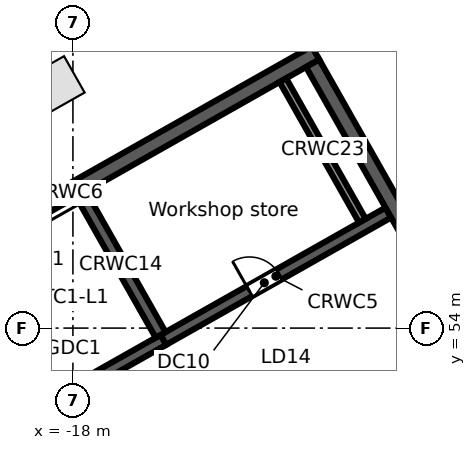
"""IFC4 building model, lengths in metres.
Left out: names, types, materials, properties, quantities, classifications, styles, units other than length and angle.
Written with IfcOpenShell. Run it as: python <this file> out.ifc"""

import sys

from ifc_helpers import new_model, si_unit, direction, frame, frame_2d, origin, origin_2d, place, context, subcontext, project, spatial, rectangle, extrude, element, fill, save


model = new_model("IFC4")
c1 = context("Model", 3, precision=1e-05, world=origin(), true_north=direction((0.0, 1.0)))
c2 = subcontext(c1, "Body", "Model", "MODEL_VIEW")
j1 = project(units=[si_unit("LENGTHUNIT", "METRE"), si_unit("PLANEANGLEUNIT", "RADIAN")], contexts=[c1])
p1 = place(None, origin())
s1 = spatial("IfcSite", under=j1, at=p1, CompositionType="ELEMENT")
p2 = place(p1, origin())
s2 = spatial("IfcBuilding", under=s1, at=p2, CompositionType="ELEMENT")
p3 = place(p2, frame((0.0, 0.0, 266.5)))
s3 = spatial("IfcBuildingStorey", under=s2, at=p3, CompositionType="ELEMENT", Elevation=266.5)
p4 = place(p3, frame((-18.441, 60.406, 0.0), z_axis=(0.0, 0.0, 1.0), x_axis=(-0.87035569594, -0.492423560103, 0.0)))
e1 = element("IfcColumn", 1, at=p4, inside=s3, PredefinedType="COLUMN", context=c2, shape_type="SweptSolid", body=[
    extrude(rectangle(XDim=1.1, YDim=1.1, at=origin_2d()), origin(), (0.0, 0.0, 1.0), 3.8),
])
p5 = place(p3, frame((-58.732, 38.771, 0.0), z_axis=(0.0, 0.0, 1.0), x_axis=(0.870355615581, 0.492423702137, 0.0)))
e2 = element("IfcWall", 2, at=p5, inside=s3, PredefinedType="STANDARD", context=c2, shape_type="SweptSolid", body=[
    extrude(rectangle(XDim=64.052, YDim=0.25, at=frame_2d((32.026, 0.0))), origin(), (0.0, 0.0, 1.0), 3.52),
])
p6 = place(p5, frame((61.259, 0.0, 0.8)))
e3 = element("IfcOpeningElement", 3, at=p6, cuts=e2, PredefinedType="OPENING", context=c2, shape_type="SweptSolid", body=[
    extrude(rectangle(XDim=2.4, YDim=2.2, at=frame_2d((1.2, 1.1))), frame((0.0, 0.135, 0.0), z_axis=(0.0, -1.0, 0.0), x_axis=(1.0, 0.0, 0.0)), (0.0, 0.0, 1.0), 0.27),
])
p7 = place(p5, frame((58.216, 0.0, 0.8)))
e4 = element("IfcOpeningElement", 4, at=p7, cuts=e2, PredefinedType="OPENING", context=c2, shape_type="SweptSolid", body=[
    extrude(rectangle(XDim=2.4, YDim=2.2, at=frame_2d((1.2, 1.1))), frame((0.0, 0.135, 0.0), z_axis=(0.0, -1.0, 0.0), x_axis=(1.0, 0.0, 0.0)), (0.0, 0.0, 1.0), 0.27),
])
p8 = place(p5, frame((55.173, 0.0, 0.8)))
e5 = element("IfcOpeningElement", 5, at=p8, cuts=e2, PredefinedType="OPENING", context=c2, shape_type="SweptSolid", body=[
    extrude(rectangle(XDim=2.4, YDim=2.2, at=frame_2d((1.2, 1.1))), frame((0.0, 0.135, 0.0), z_axis=(0.0, -1.0, 0.0), x_axis=(1.0, 0.0, 0.0)), (0.0, 0.0, 1.0), 0.27),
])
p9 = place(p5, frame((52.129, 0.0, 0.8)))
e6 = element("IfcOpeningElement", 6, at=p9, cuts=e2, PredefinedType="OPENING", context=c2, shape_type="SweptSolid", body=[
    extrude(rectangle(XDim=2.4, YDim=2.2, at=frame_2d((1.2, 1.1))), frame((0.0, 0.135, 0.0), z_axis=(0.0, -1.0, 0.0), x_axis=(1.0, 0.0, 0.0)), (0.0, 0.0, 1.0), 0.27),
])
p10 = place(p5, frame((49.086, 0.0, 0.8)))
e7 = element("IfcOpeningElement", 7, at=p10, cuts=e2, PredefinedType="OPENING", context=c2, shape_type="SweptSolid", body=[
    extrude(rectangle(XDim=2.4, YDim=2.2, at=frame_2d((1.2, 1.1))), frame((0.0, 0.135, 0.0), z_axis=(0.0, -1.0, 0.0), x_axis=(1.0, 0.0, 0.0)), (0.0, 0.0, 1.0), 0.27),
])
p11 = place(p5, frame((46.043, 0.0, 0.8)))
e8 = element("IfcOpeningElement", 8, at=p11, cuts=e2, PredefinedType="OPENING", context=c2, shape_type="SweptSolid", body=[
    extrude(rectangle(XDim=2.4, YDim=2.2, at=frame_2d((1.2, 1.1))), frame((0.0, 0.135, 0.0), z_axis=(0.0, -1.0, 0.0), x_axis=(1.0, 0.0, 0.0)), (0.0, 0.0, 1.0), 0.27),
])
p12 = place(p5, frame((43.0, 0.0, 0.8)))
e9 = element("IfcOpeningElement", 9, at=p12, cuts=e2, PredefinedType="OPENING", context=c2, shape_type="SweptSolid", body=[
    extrude(rectangle(XDim=2.4, YDim=2.2, at=frame_2d((1.2, 1.1))), frame((0.0, 0.135, 0.0), z_axis=(0.0, -1.0, 0.0), x_axis=(1.0, 0.0, 0.0)), (0.0, 0.0, 1.0), 0.27),
])
p13 = place(p5, frame((39.956, 0.0, 0.8)))
e10 = element("IfcOpeningElement", 10, at=p13, cuts=e2, PredefinedType="OPENING", context=c2, shape_type="SweptSolid", body=[
    extrude(rectangle(XDim=2.4, YDim=2.2, at=frame_2d((1.2, 1.1))), frame((0.0, 0.135, 0.0), z_axis=(0.0, -1.0, 0.0), x_axis=(1.0, 0.0, 0.0)), (0.0, 0.0, 1.0), 0.27),
])
p14 = place(p5, frame((36.913, 0.0, 0.8)))
e11 = element("IfcOpeningElement", 11, at=p14, cuts=e2, PredefinedType="OPENING", context=c2, shape_type="SweptSolid", body=[
    extrude(rectangle(XDim=2.4, YDim=2.2, at=frame_2d((1.2, 1.1))), frame((0.0, 0.135, 0.0), z_axis=(0.0, -1.0, 0.0), x_axis=(1.0, 0.0, 0.0)), (0.0, 0.0, 1.0), 0.27),
])
p15 = place(p5, frame((33.87, 0.0, 0.8)))
e12 = element("IfcOpeningElement", 12, at=p15, cuts=e2, PredefinedType="OPENING", context=c2, shape_type="SweptSolid", body=[
    extrude(rectangle(XDim=2.4, YDim=2.2, at=frame_2d((1.2, 1.1))), frame((0.0, 0.135, 0.0), z_axis=(0.0, -1.0, 0.0), x_axis=(1.0, 0.0, 0.0)), (0.0, 0.0, 1.0), 0.27),
])
p16 = place(p5, frame((30.826, 0.0, 0.8)))
e13 = element("IfcOpeningElement", 13, at=p16, cuts=e2, PredefinedType="OPENING", context=c2, shape_type="SweptSolid", body=[
    extrude(rectangle(XDim=2.4, YDim=2.2, at=frame_2d((1.2, 1.1))), frame((0.0, 0.135, 0.0), z_axis=(0.0, -1.0, 0.0), x_axis=(1.0, 0.0, 0.0)), (0.0, 0.0, 1.0), 0.27),
])
p17 = place(p5, frame((27.783, 0.0, 0.8)))
e14 = element("IfcOpeningElement", 14, at=p17, cuts=e2, PredefinedType="OPENING", context=c2, shape_type="SweptSolid", body=[
    extrude(rectangle(XDim=2.4, YDim=2.2, at=frame_2d((1.2, 1.1))), frame((0.0, 0.135, 0.0), z_axis=(0.0, -1.0, 0.0), x_axis=(1.0, 0.0, 0.0)), (0.0, 0.0, 1.0), 0.27),
])
p18 = place(p5, frame((24.74, 0.0, 0.8)))
e15 = element("IfcOpeningElement", 15, at=p18, cuts=e2, PredefinedType="OPENING", context=c2, shape_type="SweptSolid", body=[
    extrude(rectangle(XDim=2.4, YDim=2.2, at=frame_2d((1.2, 1.1))), frame((0.0, 0.135, 0.0), z_axis=(0.0, -1.0, 0.0), x_axis=(1.0, 0.0, 0.0)), (0.0, 0.0, 1.0), 0.27),
])
p19 = place(p5, frame((21.696, 0.0, 0.8)))
e16 = element("IfcOpeningElement", 16, at=p19, cuts=e2, PredefinedType="OPENING", context=c2, shape_type="SweptSolid", body=[
    extrude(rectangle(XDim=2.4, YDim=2.2, at=frame_2d((1.2, 1.1))), frame((0.0, 0.135, 0.0), z_axis=(0.0, -1.0, 0.0), x_axis=(1.0, 0.0, 0.0)), (0.0, 0.0, 1.0), 0.27),
])
p20 = place(p5, frame((18.653, 0.0, 0.8)))
e17 = element("IfcOpeningElement", 17, at=p20, cuts=e2, PredefinedType="OPENING", context=c2, shape_type="SweptSolid", body=[
    extrude(rectangle(XDim=2.4, YDim=2.2, at=frame_2d((1.2, 1.1))), frame((0.0, 0.135, 0.0), z_axis=(0.0, -1.0, 0.0), x_axis=(1.0, 0.0, 0.0)), (0.0, 0.0, 1.0), 0.27),
])
p21 = place(p5, frame((15.61, 0.0, 0.8)))
e18 = element("IfcOpeningElement", 18, at=p21, cuts=e2, PredefinedType="OPENING", context=c2, shape_type="SweptSolid", body=[
    extrude(rectangle(XDim=2.4, YDim=2.2, at=frame_2d((1.2, 1.1))), frame((0.0, 0.135, 0.0), z_axis=(0.0, -1.0, 0.0), x_axis=(1.0, 0.0, 0.0)), (0.0, 0.0, 1.0), 0.27),
])
p22 = place(p5, frame((12.567, 0.0, 0.8)))
e19 = element("IfcOpeningElement", 19, at=p22, cuts=e2, PredefinedType="OPENING", context=c2, shape_type="SweptSolid", body=[
    extrude(rectangle(XDim=2.4, YDim=2.2, at=frame_2d((1.2, 1.1))), frame((0.0, 0.135, 0.0), z_axis=(0.0, -1.0, 0.0), x_axis=(1.0, 0.0, 0.0)), (0.0, 0.0, 1.0), 0.27),
])
p23 = place(p5, frame((9.523, 0.0, 0.8)))
e20 = element("IfcOpeningElement", 20, at=p23, cuts=e2, PredefinedType="OPENING", context=c2, shape_type="SweptSolid", body=[
    extrude(rectangle(XDim=2.4, YDim=2.2, at=frame_2d((1.2, 1.1))), frame((0.0, 0.135, 0.0), z_axis=(0.0, -1.0, 0.0), x_axis=(1.0, 0.0, 0.0)), (0.0, 0.0, 1.0), 0.27),
])
p24 = place(p5, frame((6.48, 0.0, 0.8)))
e21 = element("IfcOpeningElement", 21, at=p24, cuts=e2, PredefinedType="OPENING", context=c2, shape_type="SweptSolid", body=[
    extrude(rectangle(XDim=2.4, YDim=2.2, at=frame_2d((1.2, 1.1))), frame((0.0, 0.135, 0.0), z_axis=(0.0, -1.0, 0.0), x_axis=(1.0, 0.0, 0.0)), (0.0, 0.0, 1.0), 0.27),
])
p25 = place(p5, frame((3.437, 0.0, 0.8)))
e22 = element("IfcOpeningElement", 22, at=p25, cuts=e2, PredefinedType="OPENING", context=c2, shape_type="SweptSolid", body=[
    extrude(rectangle(XDim=2.4, YDim=2.2, at=frame_2d((1.2, 1.1))), frame((0.0, 0.135, 0.0), z_axis=(0.0, -1.0, 0.0), x_axis=(1.0, 0.0, 0.0)), (0.0, 0.0, 1.0), 0.27),
])
p26 = place(p5, frame((0.393, 0.0, 0.8)))
e23 = element("IfcOpeningElement", 23, at=p26, cuts=e2, PredefinedType="OPENING", context=c2, shape_type="SweptSolid", body=[
    extrude(rectangle(XDim=2.4, YDim=2.2, at=frame_2d((1.2, 1.1))), frame((0.0, 0.135, 0.0), z_axis=(0.0, -1.0, 0.0), x_axis=(1.0, 0.0, 0.0)), (0.0, 0.0, 1.0), 0.27),
])
p27 = place(p3, frame((-13.365, 49.911, 0.0), z_axis=(0.0, 0.0, 1.0), x_axis=(0.870347618718, 0.492437836272, 0.0)))
e24 = element("IfcWall", 24, at=p27, inside=s3, PredefinedType="SOLIDWALL", context=c2, shape_type="SweptSolid", body=[
    extrude(rectangle(XDim=6.7, YDim=0.3, at=frame_2d((3.35, 0.0))), origin(), (0.0, 0.0, 1.0), 3.52),
])
p28 = place(p27, frame((0.75, 0.0, 0.0)))
e25 = element("IfcOpeningElement", 25, at=p28, cuts=e24, PredefinedType="OPENING", context=c2, shape_type="SweptSolid", body=[
    extrude(rectangle(XDim=0.9, YDim=2.1, at=frame_2d((0.45, 1.05))), frame((0.0, 0.16, 0.0), z_axis=(0.0, -1.0, 0.0), x_axis=(1.0, 0.0, 0.0)), (0.0, 0.0, 1.0), 0.32),
])
p29 = place(p27, frame((4.15, 0.0, 0.0)))
e26 = element("IfcOpeningElement", 26, at=p29, cuts=e24, PredefinedType="OPENING", context=c2, shape_type="SweptSolid", body=[
    extrude(rectangle(XDim=0.9, YDim=2.1, at=frame_2d((0.45, 1.05))), frame((0.0, 0.16, 0.0), z_axis=(0.0, -1.0, 0.0), x_axis=(1.0, 0.0, 0.0)), (0.0, 0.0, 1.0), 0.32),
])
p30 = place(p3, frame((-22.059, 50.047, 0.0), z_axis=(0.0, 0.0, 1.0), x_axis=(0.87035077051, 0.49243226567, 0.0)))
e27 = element("IfcWall", 27, at=p30, inside=s3, PredefinedType="SOLIDWALL", context=c2, shape_type="SweptSolid", body=[
    extrude(rectangle(XDim=7.4, YDim=0.3, at=frame_2d((3.7, 0.0))), origin(), (0.0, 0.0, 1.0), 3.52),
])
p31 = place(p30, frame((0.4, 0.0, 0.0)))
e28 = element("IfcOpeningElement", 28, at=p31, cuts=e27, PredefinedType="OPENING", context=c2, shape_type="SweptSolid", body=[
    extrude(rectangle(XDim=1.0, YDim=2.1, at=frame_2d((0.5, 1.05))), frame((0.0, 0.16, 0.0), z_axis=(0.0, -1.0, 0.0), x_axis=(1.0, 0.0, 0.0)), (0.0, 0.0, 1.0), 0.32),
])
p32 = place(p3, frame((-15.618, 53.691, 0.0), z_axis=(0.0, 0.0, 1.0), x_axis=(0.870362830851, 0.492410948978, 0.0)))
e29 = element("IfcWall", 29, at=p32, inside=s3, PredefinedType="SOLIDWALL", context=c2, shape_type="SweptSolid", body=[
    extrude(rectangle(XDim=6.8, YDim=0.3, at=frame_2d((3.4, 0.0))), origin(), (0.0, 0.0, 1.0), 3.52),
])
p33 = place(p32, frame((2.6, 0.0, 0.0)))
e30 = element("IfcOpeningElement", 30, at=p33, cuts=e29, PredefinedType="OPENING", context=c2, shape_type="SweptSolid", body=[
    extrude(rectangle(XDim=0.9, YDim=2.1, at=frame_2d((0.45, 1.05))), frame((0.0, 0.16, 0.0), z_axis=(0.0, -1.0, 0.0), x_axis=(1.0, 0.0, 0.0)), (0.0, 0.0, 1.0), 0.32),
])
p34 = place(p3, frame((-24.672, 53.854, 0.0), z_axis=(0.0, 0.0, 1.0), x_axis=(0.870353598469, 0.492427267353, 0.0)))
e31 = element("IfcWall", 31, at=p34, inside=s3, PredefinedType="SOLIDWALL", context=c2, shape_type="SweptSolid", body=[
    extrude(rectangle(XDim=15.0, YDim=0.4, at=frame_2d((7.5, 0.0))), origin(), (0.0, 0.0, 1.0), 3.52),
])
p35 = place(p3, frame((-24.4, 53.779, 0.0), z_axis=(0.0, 0.0, 1.0), x_axis=(0.492421663121, -0.870356769198, 0.0)))
e32 = element("IfcWall", 32, at=p35, inside=s3, PredefinedType="SOLIDWALL", context=c2, shape_type="SweptSolid", body=[
    extrude(rectangle(XDim=13.2, YDim=0.4, at=frame_2d((6.6, 0.0))), origin(), (0.0, 0.0, 1.0), 3.52),
])
p36 = place(p3, frame((-17.785, 57.521, 0.0), z_axis=(0.0, 0.0, 1.0), x_axis=(0.492422543467, -0.870356271124, 0.0)))
e33 = element("IfcWall", 33, at=p36, inside=s3, PredefinedType="SOLIDWALL", context=c2, shape_type="SweptSolid", body=[
    extrude(rectangle(XDim=4.25, YDim=0.3, at=frame_2d((2.125, 0.0))), origin(), (0.0, 0.0, 1.0), 3.52),
])
p37 = place(p3, frame((-12.476, 60.525, 0.0), z_axis=(0.0, 0.0, 1.0), x_axis=(0.492422543467, -0.870356271124, 0.0)))
e34 = element("IfcWall", 34, at=p37, inside=s3, PredefinedType="SOLIDWALL", context=c2, shape_type="SweptSolid", body=[
    extrude(rectangle(XDim=4.25, YDim=0.2, at=frame_2d((2.125, 0.0))), origin(), (0.0, 0.0, 1.0), 3.52),
])
p38 = place(p3, frame((-11.692, 60.968, 0.0), z_axis=(0.0, 0.0, 1.0), x_axis=(0.492421663121, -0.870356769198, 0.0)))
e35 = element("IfcWall", 35, at=p38, inside=s3, PredefinedType="SOLIDWALL", context=c2, shape_type="SweptSolid", body=[
    extrude(rectangle(XDim=13.2, YDim=0.4, at=frame_2d((6.6, 0.0))), origin(), (0.0, 0.0, 1.0), 3.52),
])
p39 = place(p33, origin())
e36 = element("IfcDoor", 36, at=p39, inside=s3, OperationType="SINGLE_SWING_LEFT", PredefinedType="DOOR", context=c2, shape_type="SweptSolid", body=[
    extrude(rectangle(XDim=0.9, YDim=2.1, at=frame_2d((0.45, 1.05))), frame((0.0, 0.025, 0.0), z_axis=(0.0, -1.0, 0.0), x_axis=(1.0, 0.0, 0.0)), (0.0, 0.0, 1.0), 0.05),
])
fill(e30, e36)
save(model, sys.argv[1])
